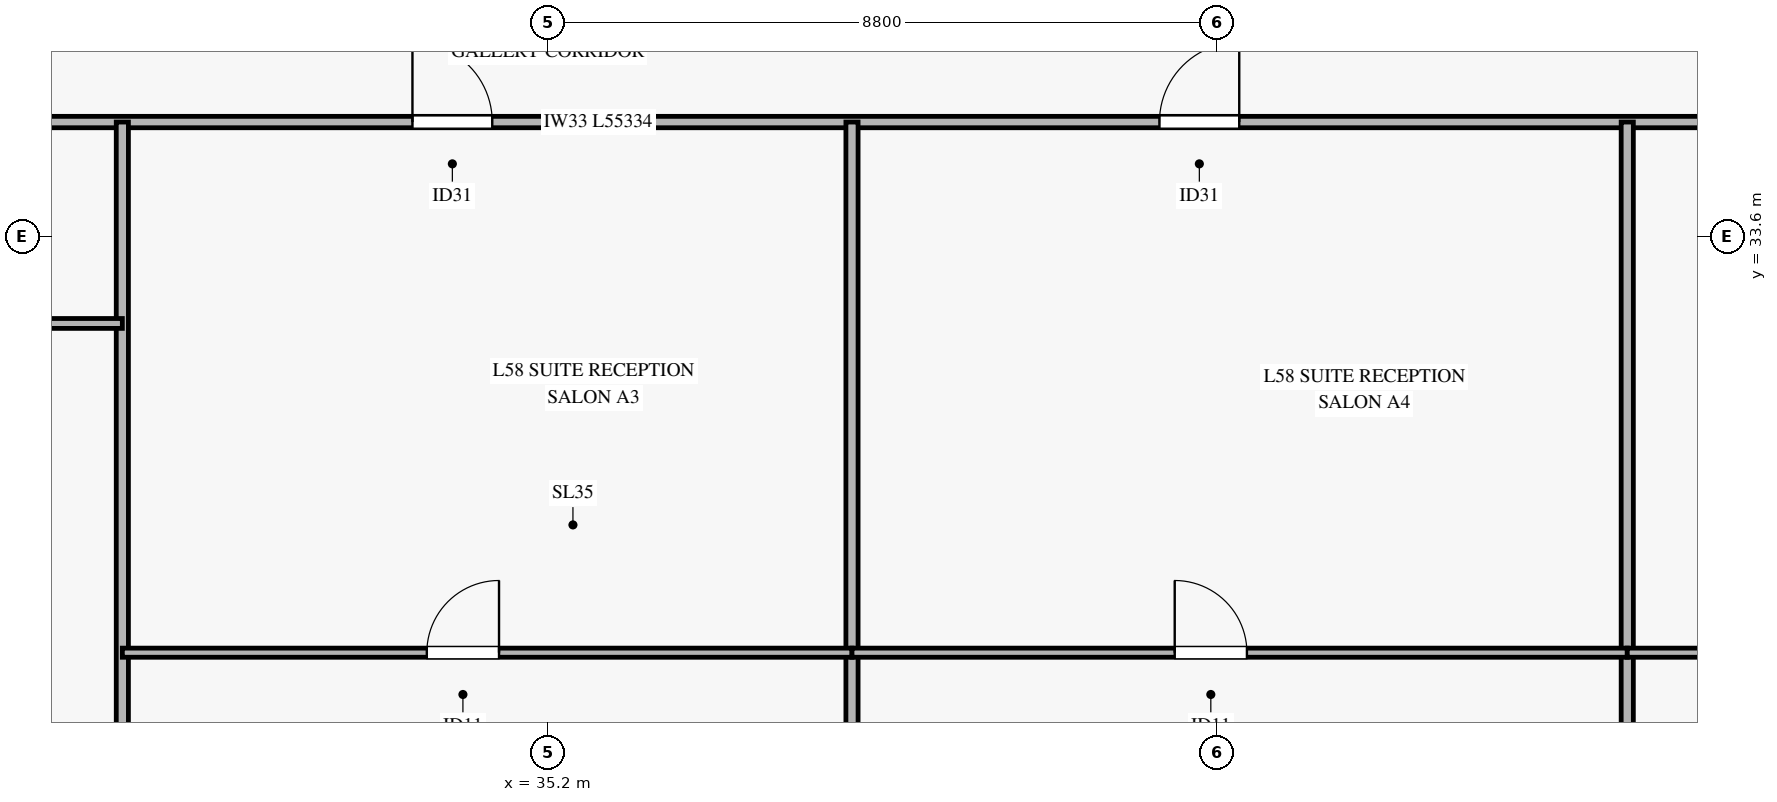
"""IFC4 building model, lengths in metres.
Left out: names, types, materials, properties, quantities, classifications, styles, units other than length and angle.
Written with IfcOpenShell. Run it as: python <this file> out.ifc"""

import sys

from ifc_helpers import new_model, si_unit, direction, frame, frame_2d, origin, place, context, subcontext, project, spatial, rectangle, extrude, source, transform, mapped, element, fill, save


model = new_model("IFC4")
c1 = context("Model", 3, precision=1e-05, world=origin(), true_north=direction((0.0, 1.0)))
c2 = subcontext(c1, "Body", "Model", "MODEL_VIEW")
j1 = project(units=[si_unit("LENGTHUNIT", "METRE"), si_unit("PLANEANGLEUNIT", "RADIAN")], contexts=[c1])
p1 = place(None, origin())
s1 = spatial("IfcSite", under=j1, at=p1, CompositionType="ELEMENT")
p2 = place(p1, origin())
s2 = spatial("IfcBuilding", under=s1, at=p2, CompositionType="ELEMENT")
p3 = place(p2, frame((0.0, 0.0, 230.4)))
s3 = spatial("IfcBuildingStorey", under=s2, at=p3, CompositionType="ELEMENT", Elevation=230.4)
p4 = place(p3, frame((7.533, 35.1, 0.0), z_axis=(0.0, 0.0, 1.0), x_axis=(1.0, 0.0, 0.0)))
e1 = element("IfcWall", 1, at=p4, inside=s3, PredefinedType="PARTITIONING", context=c2, shape_type="SweptSolid", body=[
    extrude(rectangle(XDim=55.334, YDim=0.15, at=frame_2d((27.667, 0.0))), origin(), (0.0, 0.0, 1.0), 2.37),
])
p5 = place(p4, frame((5.335, 0.0, 0.0)))
e2 = element("IfcOpeningElement", 2, at=p5, cuts=e1, PredefinedType="OPENING", context=c2, shape_type="SweptSolid", body=[
    extrude(rectangle(XDim=1.05, YDim=2.15, at=frame_2d((0.525, 1.075))), frame((0.0, 0.085, 0.0), z_axis=(0.0, -1.0, 0.0), x_axis=(1.0, 0.0, 0.0)), (0.0, 0.0, 1.0), 0.17),
])
p6 = place(p4, frame((17.207, 0.0, 0.0)))
e3 = element("IfcOpeningElement", 3, at=p6, cuts=e1, PredefinedType="OPENING", context=c2, shape_type="SweptSolid", body=[
    extrude(rectangle(XDim=1.05, YDim=2.15, at=frame_2d((0.525, 1.075))), frame((0.0, 0.085, 0.0), z_axis=(0.0, -1.0, 0.0), x_axis=(1.0, 0.0, 0.0)), (0.0, 0.0, 1.0), 0.17),
])
p7 = place(p4, frame((25.884, 0.0, 0.0)))
e4 = element("IfcOpeningElement", 4, at=p7, cuts=e1, PredefinedType="OPENING", context=c2, shape_type="SweptSolid", body=[
    extrude(rectangle(XDim=1.05, YDim=2.15, at=frame_2d((0.525, 1.075))), frame((0.0, 0.085, 0.0), z_axis=(0.0, -1.0, 0.0), x_axis=(1.0, 0.0, 0.0)), (0.0, 0.0, 1.0), 0.17),
])
p8 = place(p4, frame((35.712, 0.0, 0.0)))
e5 = element("IfcOpeningElement", 5, at=p8, cuts=e1, PredefinedType="OPENING", context=c2, shape_type="SweptSolid", body=[
    extrude(rectangle(XDim=1.05, YDim=2.15, at=frame_2d((0.525, 1.075))), frame((0.0, 0.085, 0.0), z_axis=(0.0, -1.0, 0.0), x_axis=(1.0, 0.0, 0.0)), (0.0, 0.0, 1.0), 0.17),
])
p9 = place(p4, frame((47.078, 0.0, 0.0)))
e6 = element("IfcOpeningElement", 6, at=p9, cuts=e1, PredefinedType="OPENING", context=c2, shape_type="SweptSolid", body=[
    extrude(rectangle(XDim=1.05, YDim=2.15, at=frame_2d((0.525, 1.075))), frame((0.0, 0.085, 0.0), z_axis=(0.0, -1.0, 0.0), x_axis=(1.0, 0.0, 0.0)), (0.0, 0.0, 1.0), 0.17),
])
for number, where, z_axis, x_axis in (
    (7, (29.6, 13.25, 0.0), (0.0, 0.0, 1.0), (0.0, 1.0, 0.0)),
    (8, (39.2, 13.25, 0.0), (0.0, 0.0, 1.0), (0.0, 1.0, 0.0)),
    (9, (49.4, 13.25, 0.0), (0.0, 0.0, 1.0), (0.0, 1.0, 0.0)),
):
    element("IfcWall", number, at=place(p3, frame(where, z_axis=z_axis, x_axis=x_axis)), inside=s3, PredefinedType="PARTITIONING", context=c2, shape_type="SweptSolid", body=[
        extrude(rectangle(XDim=21.85, YDim=0.16, at=frame_2d((10.925, 0.0))), origin(), (0.0, 0.0, 1.0), 2.77),
    ])
p10 = place(p3, frame((27.36, 32.45, 0.0), z_axis=(0.0, 0.0, 1.0), x_axis=(1.0, 0.0, 0.0)))
e10 = element("IfcWall", 10, at=p10, inside=s3, PredefinedType="PARTITIONING", context=c2, shape_type="SweptSolid", body=[
    extrude(rectangle(XDim=2.24, YDim=0.13, at=frame_2d((1.12, 0.0))), origin(), (0.0, 0.0, 1.0), 2.77),
])
p11 = place(p3, frame((29.6, 28.118, 0.0), z_axis=(0.0, 0.0, 1.0), x_axis=(1.0, 0.0, 0.0)))
e11 = element("IfcWall", 11, at=p11, inside=s3, PredefinedType="PARTITIONING", context=c2, shape_type="SweptSolid", body=[
    extrude(rectangle(XDim=9.6, YDim=0.12, at=frame_2d((4.8, 0.0))), origin(), (0.0, 0.0, 1.0), 2.37),
])
p12 = place(p11, frame((4.006, 0.0, 0.0)))
e12 = element("IfcOpeningElement", 12, at=p12, cuts=e11, PredefinedType="OPENING", context=c2, shape_type="SweptSolid", body=[
    extrude(rectangle(XDim=0.95, YDim=2.1, at=frame_2d((0.475, 1.05))), frame((0.0, 0.07, 0.0), z_axis=(0.0, -1.0, 0.0), x_axis=(1.0, 0.0, 0.0)), (0.0, 0.0, 1.0), 0.14),
])
p13 = place(p3, frame((39.2, 28.118, 0.0), z_axis=(0.0, 0.0, 1.0), x_axis=(1.0, 0.0, 0.0)))
e13 = element("IfcWall", 13, at=p13, inside=s3, PredefinedType="PARTITIONING", context=c2, shape_type="SweptSolid", body=[
    extrude(rectangle(XDim=10.2, YDim=0.12, at=frame_2d((5.1, 0.0))), origin(), (0.0, 0.0, 1.0), 2.37),
])
p14 = place(p13, frame((4.246, 0.0, 0.0)))
e14 = element("IfcOpeningElement", 14, at=p14, cuts=e13, PredefinedType="OPENING", context=c2, shape_type="SweptSolid", body=[
    extrude(rectangle(XDim=0.95, YDim=2.1, at=frame_2d((0.475, 1.05))), frame((0.0, 0.07, 0.0), z_axis=(0.0, -1.0, 0.0), x_axis=(1.0, 0.0, 0.0)), (0.0, 0.0, 1.0), 0.14),
])
p15 = place(p3, frame((49.4, 28.118, 0.0), z_axis=(0.0, 0.0, 1.0), x_axis=(1.0, 0.0, 0.0)))
e15 = element("IfcWall", 15, at=p15, inside=s3, PredefinedType="PARTITIONING", context=c2, shape_type="SweptSolid", body=[
    extrude(rectangle(XDim=13.467, YDim=0.12, at=frame_2d((6.733, 0.0))), origin(), (0.0, 0.0, 1.0), 2.37),
])
p16 = place(p15, frame((5.473, 0.0, 0.0)))
e16 = element("IfcOpeningElement", 16, at=p16, cuts=e15, PredefinedType="OPENING", context=c2, shape_type="SweptSolid", body=[
    extrude(rectangle(XDim=0.95, YDim=2.1, at=frame_2d((0.475, 1.05))), frame((0.0, 0.07, 0.0), z_axis=(0.0, -1.0, 0.0), x_axis=(1.0, 0.0, 0.0)), (0.0, 0.0, 1.0), 0.14),
])
m1 = source(origin(), c2, "Body", "SweptSolid", [
    extrude(rectangle(XDim=1.05, YDim=2.15, at=frame_2d((0.525, 1.075))), frame((0.0, 0.025, 0.0), z_axis=(0.0, -1.0, 0.0), x_axis=(1.0, 0.0, 0.0)), (0.0, 0.0, 1.0), 0.05),
])
p17 = place(p7, origin())
e17 = element("IfcDoor", 17, at=p17, inside=s3, OperationType="SINGLE_SWING_LEFT", PredefinedType="DOOR", context=c2, shape_type="MappedRepresentation", body=[
    mapped(m1, transform((0.0, 0.0, 0.0), x_axis=(1.0, 0.0, 0.0), y_axis=(0.0, 1.0, 0.0), z_axis=(0.0, 0.0, 1.0), scale=1.0)),
])
fill(e4, e17)
m2 = source(origin(), c2, "Body", "SweptSolid", [
    extrude(rectangle(XDim=0.95, YDim=2.1, at=frame_2d((0.475, 1.05))), frame((0.0, 0.025, 0.0), z_axis=(0.0, -1.0, 0.0), x_axis=(1.0, 0.0, 0.0)), (0.0, 0.0, 1.0), 0.05),
])
p18 = place(p12, origin())
e18 = element("IfcDoor", 18, at=p18, inside=s3, OperationType="SINGLE_SWING_RIGHT", PredefinedType="DOOR", context=c2, shape_type="MappedRepresentation", body=[
    mapped(m2, transform((0.0, 0.0, 0.0), x_axis=(1.0, 0.0, 0.0), y_axis=(0.0, 1.0, 0.0), z_axis=(0.0, 0.0, 1.0), scale=1.0)),
])
fill(e12, e18)
p19 = place(p8, origin())
e19 = element("IfcDoor", 19, at=p19, inside=s3, OperationType="SINGLE_SWING_RIGHT", PredefinedType="DOOR", context=c2, shape_type="MappedRepresentation", body=[
    mapped(m1, transform((0.0, 0.0, 0.0), x_axis=(1.0, 0.0, 0.0), y_axis=(0.0, 1.0, 0.0), z_axis=(0.0, 0.0, 1.0), scale=1.0)),
])
fill(e5, e19)
p20 = place(p14, origin())
e20 = element("IfcDoor", 20, at=p20, inside=s3, OperationType="SINGLE_SWING_LEFT", PredefinedType="DOOR", context=c2, shape_type="MappedRepresentation", body=[
    mapped(m2, transform((0.0, 0.0, 0.0), x_axis=(1.0, 0.0, 0.0), y_axis=(0.0, 1.0, 0.0), z_axis=(0.0, 0.0, 1.0), scale=1.0)),
])
fill(e14, e20)
save(model, sys.argv[1])
